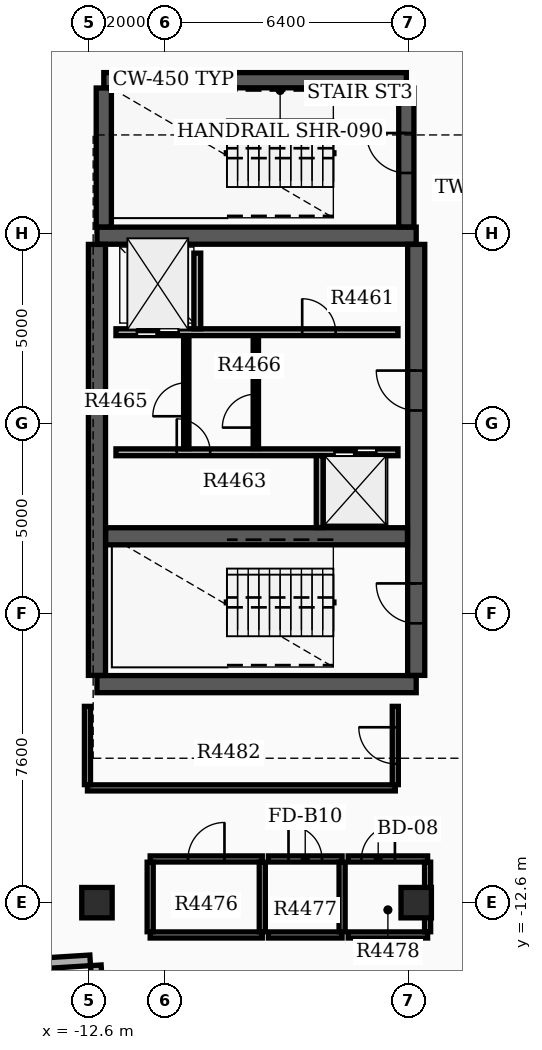
"""IFC4 building model, lengths in metres.
Left out: names, types, materials, properties, quantities, classifications, styles, units other than length and angle.
Written with IfcOpenShell. Run it as: python <this file> out.ifc"""

import sys

from ifc_helpers import new_model, si_unit, direction, frame, frame_2d, origin, origin_2d, place, context, subcontext, project, spatial, rectangle, extrude, element, fill, save


model = new_model("IFC4")
c1 = context("Model", 3, precision=1e-05, world=origin(), true_north=direction((0.0, 1.0)))
c2 = subcontext(c1, "Body", "Model", "MODEL_VIEW")
j1 = project(units=[si_unit("LENGTHUNIT", "METRE"), si_unit("PLANEANGLEUNIT", "RADIAN")], contexts=[c1])
p1 = place(None, origin())
s1 = spatial("IfcSite", under=j1, at=p1, CompositionType="ELEMENT")
p2 = place(p1, origin())
s2 = spatial("IfcBuilding", under=s1, at=p2, CompositionType="ELEMENT")
p3 = place(p2, frame((0.0, 0.0, 281.1)))
s3 = spatial("IfcBuildingStorey", under=s2, at=p3, CompositionType="ELEMENT", Elevation=281.1)
for number, where, z_axis, x_axis in (
    (1, (-12.4, -6.85, 0.0), (0.0, 0.0, 1.0), (1.0, 0.0, 0.0)),
    (2, (-12.4, 4.95, 0.0), (0.0, 0.0, 1.0), (1.0, 0.0, 0.0)),
):
    element("IfcWall", number, at=place(p3, frame(where, z_axis=z_axis, x_axis=x_axis)), inside=s3, PredefinedType="SHEAR", context=c2, shape_type="SweptSolid", body=[
        extrude(rectangle(XDim=8.4, YDim=0.45, at=frame_2d((4.2, 0.0))), origin(), (0.0, 0.0, 1.0), 3.7),
    ])
p4 = place(p3, frame((-12.4, -6.62, 0.0), z_axis=(0.0, 0.0, 1.0), x_axis=(0.0, 1.0, 0.0)))
e3 = element("IfcWall", 3, at=p4, inside=s3, PredefinedType="SHEAR", context=c2, shape_type="SweptSolid", body=[
    extrude(rectangle(XDim=11.34, YDim=0.45, at=frame_2d((5.67, 0.0))), origin(), (0.0, 0.0, 1.0), 3.7),
])
p5 = place(p3, frame((-4.0, -6.62, 0.0), z_axis=(0.0, 0.0, 1.0), x_axis=(0.0, 1.0, 0.0)))
e4 = element("IfcWall", 4, at=p5, inside=s3, PredefinedType="SHEAR", context=c2, shape_type="SweptSolid", body=[
    extrude(rectangle(XDim=11.34, YDim=0.45, at=frame_2d((5.67, 0.0))), origin(), (0.0, 0.0, 1.0), 3.7),
])
p6 = place(p5, frame((1.37, 0.0, 0.0)))
e5 = element("IfcOpeningElement", 5, at=p6, cuts=e4, PredefinedType="OPENING", context=c2, shape_type="SweptSolid", body=[
    extrude(rectangle(XDim=1.05, YDim=2.15, at=frame_2d((0.525, 1.075))), frame((0.0, 0.235, 0.0), z_axis=(0.0, -1.0, 0.0), x_axis=(1.0, 0.0, 0.0)), (0.0, 0.0, 1.0), 0.47),
])
p7 = place(p5, frame((6.97, 0.0, 0.0)))
e6 = element("IfcOpeningElement", 6, at=p7, cuts=e4, PredefinedType="OPENING", context=c2, shape_type="SweptSolid", body=[
    extrude(rectangle(XDim=1.05, YDim=2.15, at=frame_2d((0.525, 1.075))), frame((0.0, 0.235, 0.0), z_axis=(0.0, -1.0, 0.0), x_axis=(1.0, 0.0, 0.0)), (0.0, 0.0, 1.0), 0.47),
])
p8 = place(p3, frame((-12.17, -2.96, 0.0), z_axis=(0.0, 0.0, 1.0), x_axis=(1.0, 0.0, 0.0)))
e7 = element("IfcWall", 7, at=p8, inside=s3, PredefinedType="SHEAR", context=c2, shape_type="SweptSolid", body=[
    extrude(rectangle(XDim=7.94, YDim=0.45, at=frame_2d((3.97, 0.0))), origin(), (0.0, 0.0, 1.0), 3.7),
])
p9 = place(p3, frame((-12.22, 9.04, 0.0), z_axis=(0.0, 0.0, 1.0), x_axis=(1.0, 0.0, 0.0)))
e8 = element("IfcWall", 8, at=p9, inside=s3, PredefinedType="SHEAR", context=c2, shape_type="SweptSolid", body=[
    extrude(rectangle(XDim=7.96, YDim=0.4, at=frame_2d((3.98, 0.0))), origin(), (0.0, 0.0, 1.0), 3.7),
])
p10 = place(p3, frame((-12.22, 5.18, 0.0), z_axis=(0.0, 0.0, 1.0), x_axis=(0.0, 1.0, 0.0)))
e9 = element("IfcWall", 9, at=p10, inside=s3, PredefinedType="SHEAR", context=c2, shape_type="SweptSolid", body=[
    extrude(rectangle(XDim=3.655, YDim=0.4, at=frame_2d((1.828, 0.0))), origin(), (0.0, 0.0, 1.0), 3.7),
])
p11 = place(p3, frame((-4.26, 5.18, 0.0), z_axis=(0.0, 0.0, 1.0), x_axis=(0.0, 1.0, 0.0)))
e10 = element("IfcWall", 10, at=p11, inside=s3, PredefinedType="SHEAR", context=c2, shape_type="SweptSolid", body=[
    extrude(rectangle(XDim=3.655, YDim=0.4, at=frame_2d((1.828, 0.0))), origin(), (0.0, 0.0, 1.0), 3.7),
])
p12 = place(p11, frame((1.42, 0.0, 0.0)))
e11 = element("IfcOpeningElement", 11, at=p12, cuts=e10, PredefinedType="OPENING", context=c2, shape_type="SweptSolid", body=[
    extrude(rectangle(XDim=1.05, YDim=2.15, at=frame_2d((0.525, 1.075))), frame((0.0, 0.21, 0.0), z_axis=(0.0, -1.0, 0.0), x_axis=(1.0, 0.0, 0.0)), (0.0, 0.0, 1.0), 0.42),
])
for number, where, z_axis, x_axis in (
    (12, (-12.4, -12.6, 0.0), (0.0, 0.0, 1.0), (1.0, 0.0, 0.0)),
    (13, (-4.0, -12.6, 0.0), (0.0, 0.0, 1.0), (1.0, 0.0, 0.0)),
):
    element("IfcColumn", number, at=place(p3, frame(where, z_axis=z_axis, x_axis=x_axis)), inside=s3, PredefinedType="COLUMN", context=c2, shape_type="SweptSolid", body=[
        extrude(rectangle(XDim=0.8, YDim=0.8, at=origin_2d()), origin(), (0.0, 0.0, 1.0), 3.9),
    ])
p13 = place(p3, frame((-13.796, -14.194, 0.0), z_axis=(0.0, 0.0, 1.0), x_axis=(0.998023660242, 0.06283926796, 0.0)))
e14 = element("IfcWall", 14, at=p13, inside=s3, PredefinedType="STANDARD", context=c2, shape_type="SweptSolid", body=[
    extrude(rectangle(XDim=1.22, YDim=0.28, at=frame_2d((0.61, 0.0))), origin(), (0.0, 0.0, 1.0), 3.18),
])
p14 = place(p3, frame((-12.43, -14.249, 0.0), z_axis=(0.0, 0.0, 1.0), x_axis=(0.062824119533, -0.998024613927, 0.0)))
e15 = element("IfcWall", 15, at=p14, inside=s3, PredefinedType="STANDARD", context=c2, shape_type="SweptSolid", body=[
    extrude(rectangle(XDim=1.5, YDim=0.28, at=frame_2d((0.75, 0.0))), origin(), (0.0, 0.0, 1.0), 3.18),
])
p15 = place(p3, frame((-11.9, 2.41, 0.0), z_axis=(0.0, 0.0, 1.0), x_axis=(1.0, 0.0, 0.0)))
e16 = element("IfcWall", 16, at=p15, inside=s3, PredefinedType="SOLIDWALL", context=c2, shape_type="SweptSolid", body=[
    extrude(rectangle(XDim=7.42, YDim=0.18, at=frame_2d((3.71, 0.0))), origin(), (0.0, 0.0, 1.0), 3.17),
])
p16 = place(p15, frame((0.55, 0.0, 0.0)))
e17 = element("IfcOpeningElement", 17, at=p16, cuts=e16, PredefinedType="OPENING", context=c2, shape_type="SweptSolid", body=[
    extrude(rectangle(XDim=1.1, YDim=2.15, at=frame_2d((0.55, 1.075))), frame((0.0, 0.1, 0.0), z_axis=(0.0, -1.0, 0.0), x_axis=(1.0, 0.0, 0.0)), (0.0, 0.0, 1.0), 0.2),
])
p17 = place(p15, frame((4.9, 0.0, 0.0)))
e18 = element("IfcOpeningElement", 18, at=p17, cuts=e16, PredefinedType="OPENING", context=c2, shape_type="SweptSolid", body=[
    extrude(rectangle(XDim=0.88, YDim=2.1, at=frame_2d((0.44, 1.05))), frame((0.0, 0.1, 0.0), z_axis=(0.0, -1.0, 0.0), x_axis=(1.0, 0.0, 0.0)), (0.0, 0.0, 1.0), 0.2),
])
p18 = place(p3, frame((-11.9, -0.75, 0.0), z_axis=(0.0, 0.0, 1.0), x_axis=(1.0, 0.0, 0.0)))
e19 = element("IfcWall", 19, at=p18, inside=s3, PredefinedType="SOLIDWALL", context=c2, shape_type="SweptSolid", body=[
    extrude(rectangle(XDim=7.42, YDim=0.18, at=frame_2d((3.71, 0.0))), origin(), (0.0, 0.0, 1.0), 3.17),
])
p19 = place(p18, frame((5.75, 0.0, 0.0)))
e20 = element("IfcOpeningElement", 20, at=p19, cuts=e19, PredefinedType="OPENING", context=c2, shape_type="SweptSolid", body=[
    extrude(rectangle(XDim=1.1, YDim=2.15, at=frame_2d((0.55, 1.075))), frame((0.0, 0.1, 0.0), z_axis=(0.0, -1.0, 0.0), x_axis=(1.0, 0.0, 0.0)), (0.0, 0.0, 1.0), 0.2),
])
p20 = place(p18, frame((1.6, 0.0, 0.0)))
e21 = element("IfcOpeningElement", 21, at=p20, cuts=e19, PredefinedType="OPENING", context=c2, shape_type="SweptSolid", body=[
    extrude(rectangle(XDim=0.88, YDim=2.1, at=frame_2d((0.44, 1.05))), frame((0.0, 0.1, 0.0), z_axis=(0.0, -1.0, 0.0), x_axis=(1.0, 0.0, 0.0)), (0.0, 0.0, 1.0), 0.2),
])
p21 = place(p3, frame((-9.76, 2.5, 0.0), z_axis=(0.0, 0.0, 1.0), x_axis=(0.0, 1.0, 0.0)))
e22 = element("IfcWall", 22, at=p21, inside=s3, PredefinedType="SOLIDWALL", context=c2, shape_type="SweptSolid", body=[
    extrude(rectangle(XDim=1.99, YDim=0.18, at=frame_2d((0.995, 0.0))), origin(), (0.0, 0.0, 1.0), 3.17),
])
p22 = place(p3, frame((-6.54, -2.73, 0.0), z_axis=(0.0, 0.0, 1.0), x_axis=(0.0, 1.0, 0.0)))
e23 = element("IfcWall", 23, at=p22, inside=s3, PredefinedType="SOLIDWALL", context=c2, shape_type="SweptSolid", body=[
    extrude(rectangle(XDim=1.89, YDim=0.18, at=frame_2d((0.945, 0.0))), origin(), (0.0, 0.0, 1.0), 3.17),
])
p23 = place(p3, frame((-8.22, -0.65, 0.0), z_axis=(0.0, 0.0, 1.0), x_axis=(0.0, 1.0, 0.0)))
e24 = element("IfcWall", 24, at=p23, inside=s3, PredefinedType="SOLIDWALL", context=c2, shape_type="SweptSolid", body=[
    extrude(rectangle(XDim=2.96, YDim=0.14, at=frame_2d((1.48, 0.0))), origin(), (0.0, 0.0, 1.0), 3.17),
])
p24 = place(p23, frame((0.55, 0.0, 0.0)))
e25 = element("IfcOpeningElement", 25, at=p24, cuts=e24, PredefinedType="OPENING", context=c2, shape_type="SweptSolid", body=[
    extrude(rectangle(XDim=0.88, YDim=2.1, at=frame_2d((0.44, 1.05))), frame((0.0, 0.08, 0.0), z_axis=(0.0, -1.0, 0.0), x_axis=(1.0, 0.0, 0.0)), (0.0, 0.0, 1.0), 0.16),
])
p25 = place(p3, frame((-10.05, -0.652, 0.0), z_axis=(0.0, 0.0, 1.0), x_axis=(0.0, 1.0, 0.0)))
e26 = element("IfcWall", 26, at=p25, inside=s3, PredefinedType="PARTITIONING", context=c2, shape_type="SweptSolid", body=[
    extrude(rectangle(XDim=2.962, YDim=0.14, at=frame_2d((1.481, 0.0))), origin(), (0.0, 0.0, 1.0), 3.17),
])
p26 = place(p25, frame((0.85, 0.0, 0.0)))
e27 = element("IfcOpeningElement", 27, at=p26, cuts=e26, PredefinedType="OPENING", context=c2, shape_type="SweptSolid", body=[
    extrude(rectangle(XDim=0.88, YDim=2.1, at=frame_2d((0.44, 1.05))), frame((0.0, 0.08, 0.0), z_axis=(0.0, -1.0, 0.0), x_axis=(1.0, 0.0, 0.0)), (0.0, 0.0, 1.0), 0.16),
])
p27 = place(p3, frame((-11.0, -13.45, 0.0), z_axis=(0.0, 0.0, 1.0), x_axis=(1.0, 0.0, 0.0)))
e28 = element("IfcWall", 28, at=p27, inside=s3, PredefinedType="PARTITIONING", context=c2, shape_type="SweptSolid", body=[
    extrude(rectangle(XDim=2.95, YDim=0.16, at=frame_2d((1.475, 0.0))), origin(), (0.0, 0.0, 1.0), 3.17),
])
p28 = place(p3, frame((-11.0, -11.45, 0.0), z_axis=(0.0, 0.0, 1.0), x_axis=(1.0, 0.0, 0.0)))
e29 = element("IfcWall", 29, at=p28, inside=s3, PredefinedType="PARTITIONING", context=c2, shape_type="SweptSolid", body=[
    extrude(rectangle(XDim=2.95, YDim=0.16, at=frame_2d((1.475, 0.0))), origin(), (0.0, 0.0, 1.0), 3.17),
])
p29 = place(p28, frame((0.995, 0.0, 0.0)))
e30 = element("IfcOpeningElement", 30, at=p29, cuts=e29, PredefinedType="OPENING", context=c2, shape_type="SweptSolid", body=[
    extrude(rectangle(XDim=0.96, YDim=2.15, at=frame_2d((0.48, 1.075))), frame((0.0, 0.09, 0.0), z_axis=(0.0, -1.0, 0.0), x_axis=(1.0, 0.0, 0.0)), (0.0, 0.0, 1.0), 0.18),
])
for number, where, z_axis, x_axis in (
    (31, (-11.0, -13.365, 0.0), (0.0, 0.0, 1.0), (0.0, 1.0, 0.0)),
    (32, (-8.05, -13.365, 0.0), (0.0, 0.0, 1.0), (0.0, 1.0, 0.0)),
):
    element("IfcWall", number, at=place(p3, frame(where, z_axis=z_axis, x_axis=x_axis)), inside=s3, PredefinedType="PARTITIONING", context=c2, shape_type="SweptSolid", body=[
        extrude(rectangle(XDim=1.83, YDim=0.16, at=frame_2d((0.915, 0.0))), origin(), (0.0, 0.0, 1.0), 3.17),
    ])
p30 = place(p3, frame((-7.89, -13.45, 0.0), z_axis=(0.0, 0.0, 1.0), x_axis=(1.0, 0.0, 0.0)))
e33 = element("IfcWall", 33, at=p30, inside=s3, PredefinedType="PARTITIONING", context=c2, shape_type="SweptSolid", body=[
    extrude(rectangle(XDim=1.94, YDim=0.16, at=frame_2d((0.97, 0.0))), origin(), (0.0, 0.0, 1.0), 3.17),
])
p31 = place(p3, frame((-7.89, -11.45, 0.0), z_axis=(0.0, 0.0, 1.0), x_axis=(1.0, 0.0, 0.0)))
e34 = element("IfcWall", 34, at=p31, inside=s3, PredefinedType="PARTITIONING", context=c2, shape_type="SweptSolid", body=[
    extrude(rectangle(XDim=1.94, YDim=0.16, at=frame_2d((0.97, 0.0))), origin(), (0.0, 0.0, 1.0), 3.17),
])
p32 = place(p31, frame((0.53, 0.0, 0.0)))
e35 = element("IfcOpeningElement", 35, at=p32, cuts=e34, PredefinedType="OPENING", context=c2, shape_type="SweptSolid", body=[
    extrude(rectangle(XDim=0.88, YDim=2.1, at=frame_2d((0.44, 1.05))), frame((0.0, 0.09, 0.0), z_axis=(0.0, -1.0, 0.0), x_axis=(1.0, 0.0, 0.0)), (0.0, 0.0, 1.0), 0.18),
])
p33 = place(p3, frame((-5.95, -13.365, 0.0), z_axis=(0.0, 0.0, 1.0), x_axis=(0.0, 1.0, 0.0)))
e36 = element("IfcWall", 36, at=p33, inside=s3, PredefinedType="PARTITIONING", context=c2, shape_type="SweptSolid", body=[
    extrude(rectangle(XDim=1.83, YDim=0.16, at=frame_2d((0.915, 0.0))), origin(), (0.0, 0.0, 1.0), 3.17),
])
p34 = place(p3, frame((-5.79, -13.45, 0.0), z_axis=(0.0, 0.0, 1.0), x_axis=(1.0, 0.0, 0.0)))
e37 = element("IfcWall", 37, at=p34, inside=s3, PredefinedType="PARTITIONING", context=c2, shape_type="SweptSolid", body=[
    extrude(rectangle(XDim=2.09, YDim=0.16, at=frame_2d((1.045, 0.0))), origin(), (0.0, 0.0, 1.0), 3.17),
])
p35 = place(p3, frame((-5.79, -11.45, 0.0), z_axis=(0.0, 0.0, 1.0), x_axis=(1.0, 0.0, 0.0)))
e38 = element("IfcWall", 38, at=p35, inside=s3, PredefinedType="PARTITIONING", context=c2, shape_type="SweptSolid", body=[
    extrude(rectangle(XDim=2.09, YDim=0.16, at=frame_2d((1.045, 0.0))), origin(), (0.0, 0.0, 1.0), 3.17),
])
p36 = place(p35, frame((0.35, 0.0, 0.0)))
e39 = element("IfcOpeningElement", 39, at=p36, cuts=e38, PredefinedType="OPENING", context=c2, shape_type="SweptSolid", body=[
    extrude(rectangle(XDim=0.88, YDim=2.15, at=frame_2d((0.44, 1.075))), frame((0.0, 0.09, 0.0), z_axis=(0.0, -1.0, 0.0), x_axis=(1.0, 0.0, 0.0)), (0.0, 0.0, 1.0), 0.18),
])
p37 = place(p3, frame((-3.7, -13.365, 0.0), z_axis=(0.0, 0.0, 1.0), x_axis=(0.0, 1.0, 0.0)))
e40 = element("IfcWall", 40, at=p37, inside=s3, PredefinedType="PARTITIONING", context=c2, shape_type="SweptSolid", body=[
    extrude(rectangle(XDim=1.83, YDim=0.16, at=frame_2d((0.915, 0.0))), origin(), (0.0, 0.0, 1.0), 3.17),
])
p38 = place(p3, frame((-12.65, -9.58, 0.0), z_axis=(0.0, 0.0, 1.0), x_axis=(1.0, 0.0, 0.0)))
e41 = element("IfcWall", 41, at=p38, inside=s3, PredefinedType="PARTITIONING", context=c2, shape_type="SweptSolid", body=[
    extrude(rectangle(XDim=8.1, YDim=0.16, at=frame_2d((4.05, 0.0))), origin(), (0.0, 0.0, 1.0), 3.17),
])
p39 = place(p3, frame((-12.65, -9.495, 0.0), z_axis=(0.0, 0.0, 1.0), x_axis=(0.0, 1.0, 0.0)))
e42 = element("IfcWall", 42, at=p39, inside=s3, PredefinedType="PARTITIONING", context=c2, shape_type="SweptSolid", body=[
    extrude(rectangle(XDim=2.06, YDim=0.16, at=frame_2d((1.03, 0.0))), origin(), (0.0, 0.0, 1.0), 3.17),
])
p40 = place(p3, frame((-4.55, -9.495, 0.0), z_axis=(0.0, 0.0, 1.0), x_axis=(0.0, 1.0, 0.0)))
e43 = element("IfcWall", 43, at=p40, inside=s3, PredefinedType="PARTITIONING", context=c2, shape_type="SweptSolid", body=[
    extrude(rectangle(XDim=2.06, YDim=0.16, at=frame_2d((1.03, 0.0))), origin(), (0.0, 0.0, 1.0), 3.17),
])
p41 = place(p40, frame((0.55, 0.0, 0.0)))
e44 = element("IfcOpeningElement", 44, at=p41, cuts=e43, PredefinedType="OPENING", context=c2, shape_type="SweptSolid", body=[
    extrude(rectangle(XDim=0.96, YDim=2.15, at=frame_2d((0.48, 1.075))), frame((0.0, 0.09, 0.0), z_axis=(0.0, -1.0, 0.0), x_axis=(1.0, 0.0, 0.0)), (0.0, 0.0, 1.0), 0.18),
])
p42 = place(p6, origin())
e45 = element("IfcDoor", 45, at=p42, inside=s3, OperationType="SINGLE_SWING_RIGHT", PredefinedType="DOOR", context=c2, shape_type="SweptSolid", body=[
    extrude(rectangle(XDim=1.05, YDim=2.15, at=frame_2d((0.525, 1.075))), frame((0.0, 0.025, 0.0), z_axis=(0.0, -1.0, 0.0), x_axis=(1.0, 0.0, 0.0)), (0.0, 0.0, 1.0), 0.05),
])
fill(e5, e45)
p43 = place(p7, origin())
e46 = element("IfcDoor", 46, at=p43, inside=s3, OperationType="SINGLE_SWING_RIGHT", PredefinedType="DOOR", context=c2, shape_type="SweptSolid", body=[
    extrude(rectangle(XDim=1.05, YDim=2.15, at=frame_2d((0.525, 1.075))), frame((0.0, 0.025, 0.0), z_axis=(0.0, -1.0, 0.0), x_axis=(1.0, 0.0, 0.0)), (0.0, 0.0, 1.0), 0.05),
])
fill(e6, e46)
p44 = place(p12, origin())
e47 = element("IfcDoor", 47, at=p44, inside=s3, OperationType="SINGLE_SWING_RIGHT", PredefinedType="DOOR", context=c2, shape_type="SweptSolid", body=[
    extrude(rectangle(XDim=1.05, YDim=2.15, at=frame_2d((0.525, 1.075))), frame((0.0, 0.025, 0.0), z_axis=(0.0, -1.0, 0.0), x_axis=(1.0, 0.0, 0.0)), (0.0, 0.0, 1.0), 0.05),
])
fill(e11, e47)
p45 = place(p16, origin())
e48 = element("IfcDoor", 48, at=p45, inside=s3, OperationType="DOUBLE_DOOR_SLIDING", PredefinedType="DOOR", context=c2, shape_type="SweptSolid", body=[
    extrude(rectangle(XDim=1.1, YDim=2.15, at=frame_2d((0.55, 1.075))), frame((0.0, 0.025, 0.0), z_axis=(0.0, -1.0, 0.0), x_axis=(1.0, 0.0, 0.0)), (0.0, 0.0, 1.0), 0.05),
])
fill(e17, e48)
p46 = place(p19, origin())
e49 = element("IfcDoor", 49, at=p46, inside=s3, OperationType="DOUBLE_DOOR_SLIDING", PredefinedType="DOOR", context=c2, shape_type="SweptSolid", body=[
    extrude(rectangle(XDim=1.1, YDim=2.15, at=frame_2d((0.55, 1.075))), frame((0.0, 0.025, 0.0), z_axis=(0.0, -1.0, 0.0), x_axis=(1.0, 0.0, 0.0)), (0.0, 0.0, 1.0), 0.05),
])
fill(e20, e49)
p47 = place(p17, origin())
e50 = element("IfcDoor", 50, at=p47, inside=s3, OperationType="SINGLE_SWING_LEFT", PredefinedType="DOOR", context=c2, shape_type="SweptSolid", body=[
    extrude(rectangle(XDim=0.88, YDim=2.1, at=frame_2d((0.44, 1.05))), frame((0.0, 0.025, 0.0), z_axis=(0.0, -1.0, 0.0), x_axis=(1.0, 0.0, 0.0)), (0.0, 0.0, 1.0), 0.05),
])
fill(e18, e50)
p48 = place(p20, origin())
e51 = element("IfcDoor", 51, at=p48, inside=s3, OperationType="SINGLE_SWING_LEFT", PredefinedType="DOOR", context=c2, shape_type="SweptSolid", body=[
    extrude(rectangle(XDim=0.88, YDim=2.1, at=frame_2d((0.44, 1.05))), frame((0.0, 0.025, 0.0), z_axis=(0.0, -1.0, 0.0), x_axis=(1.0, 0.0, 0.0)), (0.0, 0.0, 1.0), 0.05),
])
fill(e21, e51)
p49 = place(p24, origin())
e52 = element("IfcDoor", 52, at=p49, inside=s3, OperationType="SINGLE_SWING_LEFT", PredefinedType="DOOR", context=c2, shape_type="SweptSolid", body=[
    extrude(rectangle(XDim=0.88, YDim=2.1, at=frame_2d((0.44, 1.05))), frame((0.0, 0.025, 0.0), z_axis=(0.0, -1.0, 0.0), x_axis=(1.0, 0.0, 0.0)), (0.0, 0.0, 1.0), 0.05),
])
fill(e25, e52)
p50 = place(p26, origin())
e53 = element("IfcDoor", 53, at=p50, inside=s3, OperationType="SINGLE_SWING_LEFT", PredefinedType="DOOR", context=c2, shape_type="SweptSolid", body=[
    extrude(rectangle(XDim=0.88, YDim=2.1, at=frame_2d((0.44, 1.05))), frame((0.0, 0.025, 0.0), z_axis=(0.0, -1.0, 0.0), x_axis=(1.0, 0.0, 0.0)), (0.0, 0.0, 1.0), 0.05),
])
fill(e27, e53)
p51 = place(p29, origin())
e54 = element("IfcDoor", 54, at=p51, inside=s3, OperationType="SINGLE_SWING_RIGHT", PredefinedType="DOOR", context=c2, shape_type="SweptSolid", body=[
    extrude(rectangle(XDim=0.96, YDim=2.15, at=frame_2d((0.48, 1.075))), frame((0.0, 0.025, 0.0), z_axis=(0.0, -1.0, 0.0), x_axis=(1.0, 0.0, 0.0)), (0.0, 0.0, 1.0), 0.05),
])
fill(e30, e54)
p52 = place(p32, origin())
e55 = element("IfcDoor", 55, at=p52, inside=s3, OperationType="SINGLE_SWING_LEFT", PredefinedType="DOOR", context=c2, shape_type="SweptSolid", body=[
    extrude(rectangle(XDim=0.88, YDim=2.1, at=frame_2d((0.44, 1.05))), frame((0.0, 0.025, 0.0), z_axis=(0.0, -1.0, 0.0), x_axis=(1.0, 0.0, 0.0)), (0.0, 0.0, 1.0), 0.05),
])
fill(e35, e55)
p53 = place(p36, origin())
e56 = element("IfcDoor", 56, at=p53, inside=s3, OperationType="SINGLE_SWING_RIGHT", PredefinedType="DOOR", context=c2, shape_type="SweptSolid", body=[
    extrude(rectangle(XDim=0.88, YDim=2.15, at=frame_2d((0.44, 1.075))), frame((0.0, 0.025, 0.0), z_axis=(0.0, -1.0, 0.0), x_axis=(1.0, 0.0, 0.0)), (0.0, 0.0, 1.0), 0.05),
])
fill(e39, e56)
p54 = place(p41, origin())
e57 = element("IfcDoor", 57, at=p54, inside=s3, OperationType="SINGLE_SWING_RIGHT", PredefinedType="DOOR", context=c2, shape_type="SweptSolid", body=[
    extrude(rectangle(XDim=0.96, YDim=2.15, at=frame_2d((0.48, 1.075))), frame((0.0, 0.025, 0.0), z_axis=(0.0, -1.0, 0.0), x_axis=(1.0, 0.0, 0.0)), (0.0, 0.0, 1.0), 0.05),
])
fill(e44, e57)
save(model, sys.argv[1])
